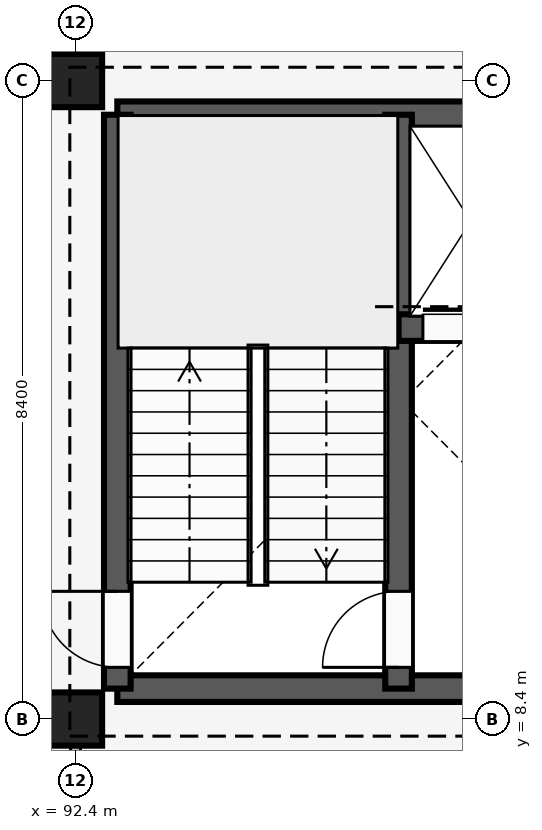
"""IFC4 building model, lengths in metres.
Left out: names, types, materials, properties, quantities, classifications, styles, units other than length and angle.
Written with IfcOpenShell. Run it as: python <this file> out.ifc"""

import sys

from ifc_helpers import new_model, si_unit, direction, frame, frame_2d, origin, origin_2d, place, context, subcontext, project, spatial, rectangle, extrude, element, fill, save


model = new_model("IFC4")
c1 = context("Model", 3, precision=1e-05, world=origin(), true_north=direction((0.0, 1.0)))
c2 = subcontext(c1, "Body", "Model", "MODEL_VIEW")
j1 = project(units=[si_unit("LENGTHUNIT", "METRE"), si_unit("PLANEANGLEUNIT", "RADIAN")], contexts=[c1])
p1 = place(None, origin())
s1 = spatial("IfcSite", under=j1, at=p1, CompositionType="ELEMENT")
p2 = place(p1, origin())
s2 = spatial("IfcBuilding", under=s1, at=p2, CompositionType="ELEMENT")
p3 = place(p2, frame((0.0, 0.0, 16.2)))
s3 = spatial("IfcBuildingStorey", under=s2, at=p3, CompositionType="ELEMENT", Elevation=16.2)
for number, where, z_axis, x_axis in (
    (1, (92.4, 8.4, 0.0), (0.0, 0.0, 1.0), (1.0, 0.0, 0.0)),
    (2, (92.4, 16.8, 0.0), (0.0, 0.0, 1.0), (1.0, 0.0, 0.0)),
):
    element("IfcColumn", number, at=place(p3, frame(where, z_axis=z_axis, x_axis=x_axis)), inside=s3, PredefinedType="COLUMN", context=c2, shape_type="SweptSolid", body=[
        extrude(rectangle(XDim=0.7, YDim=0.7, at=origin_2d()), origin(), (0.0, 0.0, 1.0), 4.2),
    ])
p4 = place(p3, frame((92.95, 8.8, 0.0), z_axis=(0.0, 0.0, 1.0), x_axis=(1.0, 0.0, 0.0)))
e3 = element("IfcWall", 3, at=p4, inside=s3, PredefinedType="SHEAR", context=c2, shape_type="SweptSolid", body=[
    extrude(rectangle(XDim=7.5, YDim=0.35, at=frame_2d((3.75, 0.0))), origin(), (0.0, 0.0, 1.0), 3.92),
])
p5 = place(p4, frame((4.85, 0.0, 0.0)))
e4 = element("IfcOpeningElement", 4, at=p5, cuts=e3, PredefinedType="OPENING", context=c2, shape_type="SweptSolid", body=[
    extrude(rectangle(XDim=1.2, YDim=2.2, at=frame_2d((0.6, 1.1))), frame((0.0, 0.185, 0.0), z_axis=(0.0, -1.0, 0.0), x_axis=(1.0, 0.0, 0.0)), (0.0, 0.0, 1.0), 0.37),
])
p6 = place(p3, frame((92.95, 16.35, 0.0), z_axis=(0.0, 0.0, 1.0), x_axis=(1.0, 0.0, 0.0)))
e5 = element("IfcWall", 5, at=p6, inside=s3, PredefinedType="SHEAR", context=c2, shape_type="SweptSolid", body=[
    extrude(rectangle(XDim=7.5, YDim=0.35, at=frame_2d((3.75, 0.0))), origin(), (0.0, 0.0, 1.0), 3.92),
])
p7 = place(p3, frame((92.95, 8.8, 0.0), z_axis=(0.0, 0.0, 1.0), x_axis=(0.0, 1.0, 0.0)))
e6 = element("IfcWall", 6, at=p7, inside=s3, PredefinedType="SHEAR", context=c2, shape_type="SweptSolid", body=[
    extrude(rectangle(XDim=7.55, YDim=0.35, at=frame_2d((3.775, 0.0))), origin(), (0.0, 0.0, 1.0), 3.92),
])
p8 = place(p7, frame((0.28, 0.0, 0.0)))
e7 = element("IfcOpeningElement", 7, at=p8, cuts=e6, PredefinedType="OPENING", context=c2, shape_type="SweptSolid", body=[
    extrude(rectangle(XDim=1.0, YDim=2.15, at=frame_2d((0.5, 1.075))), frame((0.0, 0.185, 0.0), z_axis=(0.0, -1.0, 0.0), x_axis=(1.0, 0.0, 0.0)), (0.0, 0.0, 1.0), 0.37),
])
p9 = place(p3, frame((96.65, 8.8, 0.0), z_axis=(0.0, 0.0, 1.0), x_axis=(0.0, 1.0, 0.0)))
e8 = element("IfcWall", 8, at=p9, inside=s3, PredefinedType="SHEAR", context=c2, shape_type="SweptSolid", body=[
    extrude(rectangle(XDim=7.55, YDim=0.35, at=frame_2d((3.775, 0.0))), origin(), (0.0, 0.0, 1.0), 3.92),
])
p10 = place(p9, frame((0.28, 0.0, 0.0)))
e9 = element("IfcOpeningElement", 9, at=p10, cuts=e8, PredefinedType="OPENING", context=c2, shape_type="SweptSolid", body=[
    extrude(rectangle(XDim=1.0, YDim=2.15, at=frame_2d((0.5, 1.075))), frame((0.0, 0.185, 0.0), z_axis=(0.0, -1.0, 0.0), x_axis=(1.0, 0.0, 0.0)), (0.0, 0.0, 1.0), 0.37),
])
p11 = place(p3, frame((96.65, 13.55, 0.0), z_axis=(0.0, 0.0, 1.0), x_axis=(1.0, 0.0, 0.0)))
e10 = element("IfcWall", 10, at=p11, inside=s3, PredefinedType="SHEAR", context=c2, shape_type="SweptSolid", body=[
    extrude(rectangle(XDim=3.8, YDim=0.35, at=frame_2d((1.9, 0.0))), origin(), (0.0, 0.0, 1.0), 3.92),
])
p12 = place(p11, frame((0.32, 0.0, 0.0)))
e11 = element("IfcOpeningElement", 11, at=p12, cuts=e10, PredefinedType="OPENING", context=c2, shape_type="SweptSolid", body=[
    extrude(rectangle(XDim=1.4, YDim=2.25, at=frame_2d((0.7, 1.125))), frame((0.0, 0.185, 0.0), z_axis=(0.0, -1.0, 0.0), x_axis=(1.0, 0.0, 0.0)), (0.0, 0.0, 1.0), 0.37),
])
p13 = place(p11, frame((2.04, 0.0, 0.0)))
e12 = element("IfcOpeningElement", 12, at=p13, cuts=e10, PredefinedType="OPENING", context=c2, shape_type="SweptSolid", body=[
    extrude(rectangle(XDim=1.1, YDim=2.15, at=frame_2d((0.55, 1.075))), frame((0.0, 0.185, 0.0), z_axis=(0.0, -1.0, 0.0), x_axis=(1.0, 0.0, 0.0)), (0.0, 0.0, 1.0), 0.37),
])
p14 = place(p3, frame((92.4, 0.14, 0.0), z_axis=(0.0, 0.0, 1.0), x_axis=(0.0, 1.0, 0.0)))
e13 = element("IfcWall", 13, at=p14, inside=s3, PredefinedType="PARTITIONING", context=c2, shape_type="SweptSolid", body=[
    extrude(rectangle(XDim=8.21, YDim=0.13, at=frame_2d((4.105, 0.0))), origin(), (0.0, 0.0, 1.0), 3.3),
])
p15 = place(p14, frame((3.64, 0.0, 0.0)))
e14 = element("IfcOpeningElement", 14, at=p15, cuts=e13, PredefinedType="OPENING", context=c2, shape_type="SweptSolid", body=[
    extrude(rectangle(XDim=1.08, YDim=2.15, at=frame_2d((0.54, 1.075))), frame((0.0, 0.075, 0.0), z_axis=(0.0, -1.0, 0.0), x_axis=(1.0, 0.0, 0.0)), (0.0, 0.0, 1.0), 0.15),
])
p16 = place(p3, frame((92.4, 17.15, 0.0), z_axis=(0.0, 0.0, 1.0), x_axis=(0.0, 1.0, 0.0)))
e15 = element("IfcWall", 15, at=p16, inside=s3, PredefinedType="PARTITIONING", context=c2, shape_type="SweptSolid", body=[
    extrude(rectangle(XDim=7.91, YDim=0.13, at=frame_2d((3.955, 0.0))), origin(), (0.0, 0.0, 1.0), 3.3),
])
p17 = place(p16, frame((3.4, 0.0, 0.0)))
e16 = element("IfcOpeningElement", 16, at=p17, cuts=e15, PredefinedType="OPENING", context=c2, shape_type="SweptSolid", body=[
    extrude(rectangle(XDim=1.05, YDim=2.2, at=frame_2d((0.525, 1.1))), frame((0.0, 0.075, 0.0), z_axis=(0.0, -1.0, 0.0), x_axis=(1.0, 0.0, 0.0)), (0.0, 0.0, 1.0), 0.15),
])
p18 = place(p8, origin())
e17 = element("IfcDoor", 17, at=p18, inside=s3, OperationType="SINGLE_SWING_RIGHT", PredefinedType="DOOR", context=c2, shape_type="SweptSolid", body=[
    extrude(rectangle(XDim=1.0, YDim=2.15, at=frame_2d((0.5, 1.075))), frame((0.0, 0.025, 0.0), z_axis=(0.0, -1.0, 0.0), x_axis=(1.0, 0.0, 0.0)), (0.0, 0.0, 1.0), 0.05),
])
fill(e7, e17)
p19 = place(p10, origin())
e18 = element("IfcDoor", 18, at=p19, inside=s3, OperationType="SINGLE_SWING_LEFT", PredefinedType="DOOR", context=c2, shape_type="SweptSolid", body=[
    extrude(rectangle(XDim=1.0, YDim=2.15, at=frame_2d((0.5, 1.075))), frame((0.0, 0.025, 0.0), z_axis=(0.0, -1.0, 0.0), x_axis=(1.0, 0.0, 0.0)), (0.0, 0.0, 1.0), 0.05),
])
fill(e9, e18)
p20 = place(p12, origin())
e19 = element("IfcDoor", 19, at=p20, inside=s3, OperationType="SLIDING_TO_LEFT", PredefinedType="DOOR", context=c2, shape_type="SweptSolid", body=[
    extrude(rectangle(XDim=1.4, YDim=2.25, at=frame_2d((0.7, 1.125))), frame((0.0, 0.025, 0.0), z_axis=(0.0, -1.0, 0.0), x_axis=(1.0, 0.0, 0.0)), (0.0, 0.0, 1.0), 0.05),
])
fill(e11, e19)
save(model, sys.argv[1])
